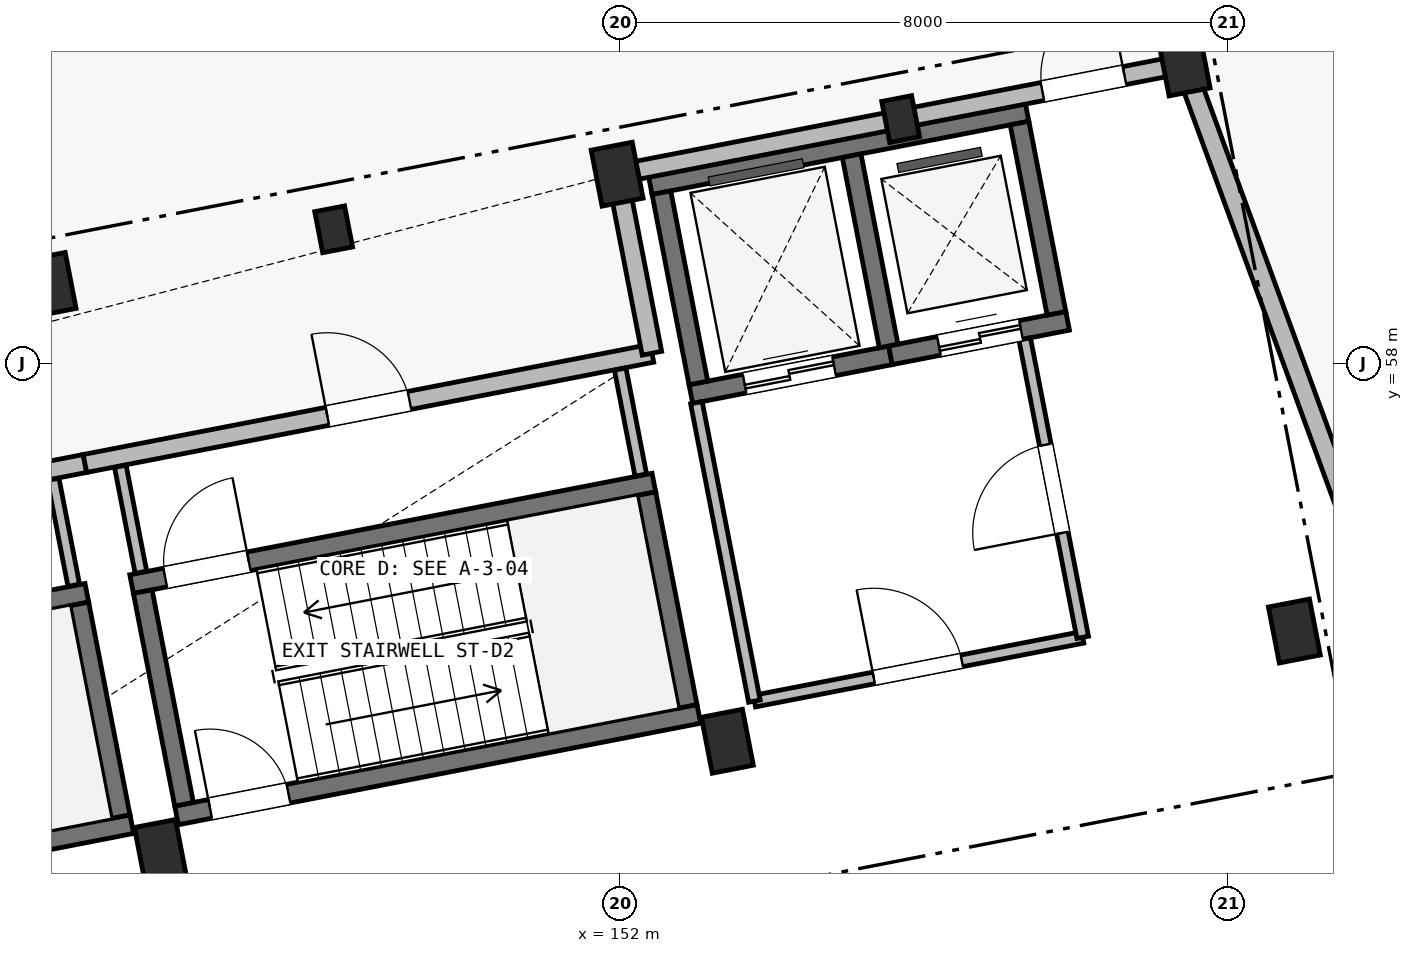
"""IFC4 building model, lengths in metres.
Left out: names, types, materials, properties, quantities, classifications, styles, units other than length and angle.
Written with IfcOpenShell. Run it as: python <this file> out.ifc"""

import sys

from ifc_helpers import new_model, si_unit, direction, frame, frame_2d, origin, origin_2d, place, context, subcontext, project, spatial, rectangle, extrude, element, fill, save


model = new_model("IFC4")
c1 = context("Model", 3, precision=1e-05, world=origin(), true_north=direction((0.0, 1.0)))
c2 = subcontext(c1, "Body", "Model", "MODEL_VIEW")
j1 = project(units=[si_unit("LENGTHUNIT", "METRE"), si_unit("PLANEANGLEUNIT", "RADIAN")], contexts=[c1])
p1 = place(None, origin())
s1 = spatial("IfcSite", under=j1, at=p1, CompositionType="ELEMENT")
p2 = place(p1, origin())
s2 = spatial("IfcBuilding", under=s1, at=p2, CompositionType="ELEMENT")
p3 = place(p2, origin())
s3 = spatial("IfcBuildingStorey", under=s2, at=p3, CompositionType="ELEMENT", Elevation=0.0)
for number, where, z_axis, x_axis in (
    (1, (145.952, 51.58, -0.35), (0.0, 0.0, 1.0), (0.982, 0.191, 0.0)),
    (2, (144.502, 59.041, -0.35), (0.0, 0.0, 1.0), (0.982, 0.191, 0.0)),
    (3, (153.412, 53.03, -0.35), (0.0, 0.0, 1.0), (0.982, 0.191, 0.0)),
    (4, (151.962, 60.491, -0.35), (0.0, 0.0, 1.0), (0.982, 0.191, 0.0)),
    (5, (160.873, 54.48, -0.35), (0.0, 0.0, 1.0), (0.982, 0.191, 0.0)),
    (6, (159.422, 61.941, -0.35), (0.0, 0.0, 1.0), (0.982, 0.191, 0.0)),
):
    element("IfcColumn", number, at=place(p3, frame(where, z_axis=z_axis, x_axis=x_axis)), inside=s3, PredefinedType="COLUMN", context=c2, shape_type="SweptSolid", body=[
        extrude(rectangle(XDim=0.55, YDim=0.75, at=origin_2d()), origin(), (0.0, 0.0, 1.0), 4.85),
    ])
for number, where, z_axis, x_axis in (
    (7, (148.232, 59.766, -0.35), (0.0, 0.0, 1.0), (0.982, 0.191, 0.0)),
    (8, (155.692, 61.216, -0.35), (0.0, 0.0, 1.0), (0.982, 0.191, 0.0)),
):
    element("IfcColumn", number, at=place(p3, frame(where, z_axis=z_axis, x_axis=x_axis)), inside=s3, PredefinedType="PILASTER", context=c2, shape_type="SweptSolid", body=[
        extrude(rectangle(XDim=0.4, YDim=0.55, at=origin_2d()), origin(), (0.0, 0.0, 1.0), 3.7),
    ])
p4 = place(p3, frame((152.397, 60.346, -0.35), z_axis=(0.0, 0.0, 1.0), x_axis=(0.981635261308, 0.190767433692, 0.0)))
e9 = element("IfcWall", 9, at=p4, inside=s3, PredefinedType="SHEAR", context=c2, shape_type="SweptSolid", body=[
    extrude(rectangle(XDim=5.05, YDim=0.25, at=frame_2d((2.525, 0.0))), origin(), (0.0, 0.0, 1.0), 4.85),
])
p5 = place(p3, frame((152.932, 57.598, -0.35), z_axis=(0.0, 0.0, 1.0), x_axis=(0.981636759622, 0.190759723627, 0.0)))
e10 = element("IfcWall", 10, at=p5, inside=s3, PredefinedType="SHEAR", context=c2, shape_type="SweptSolid", body=[
    extrude(rectangle(XDim=2.675, YDim=0.25, at=frame_2d((1.337, 0.0))), origin(), (0.0, 0.0, 1.0), 4.85),
])
p6 = place(p5, frame((0.72, 0.0, 0.35)))
e11 = element("IfcOpeningElement", 11, at=p6, cuts=e10, PredefinedType="OPENING", context=c2, shape_type="SweptSolid", body=[
    extrude(rectangle(XDim=1.2, YDim=2.2, at=frame_2d((0.6, 1.1))), frame((0.0, 0.14, 0.0), z_axis=(0.0, -1.0, 0.0), x_axis=(1.0, 0.0, 0.0)), (0.0, 0.0, 1.0), 0.28),
])
p7 = place(p3, frame((155.558, 58.108, -0.35), z_axis=(0.0, 0.0, 1.0), x_axis=(0.981633573872, 0.190776116556, 0.0)))
e12 = element("IfcWall", 12, at=p7, inside=s3, PredefinedType="SHEAR", context=c2, shape_type="SweptSolid", body=[
    extrude(rectangle(XDim=2.375, YDim=0.25, at=frame_2d((1.188, 0.0))), origin(), (0.0, 0.0, 1.0), 4.85),
])
p8 = place(p7, frame((0.65, 0.0, 0.35)))
e13 = element("IfcOpeningElement", 13, at=p8, cuts=e12, PredefinedType="OPENING", context=c2, shape_type="SweptSolid", body=[
    extrude(rectangle(XDim=1.1, YDim=2.15, at=frame_2d((0.55, 1.075))), frame((0.0, 0.14, 0.0), z_axis=(0.0, -1.0, 0.0), x_axis=(1.0, 0.0, 0.0)), (0.0, 0.0, 1.0), 0.28),
])
for number, where, z_axis, x_axis in (
    (14, (153.031, 57.744, -0.35), (0.0, 0.0, 1.0), (-0.191, 0.982, 0.0)),
    (15, (155.534, 58.231, -0.35), (0.0, 0.0, 1.0), (-0.191, 0.982, 0.0)),
    (16, (157.742, 58.66, -0.35), (0.0, 0.0, 1.0), (-0.191, 0.982, 0.0)),
):
    element("IfcWall", number, at=place(p3, frame(where, z_axis=z_axis, x_axis=x_axis)), inside=s3, PredefinedType="SHEAR", context=c2, shape_type="SweptSolid", body=[
        extrude(rectangle(XDim=2.55, YDim=0.25, at=frame_2d((1.275, 0.0))), origin(), (0.0, 0.0, 1.0), 4.85),
    ])
p9 = place(p3, frame((138.113, 53.647, -0.35), z_axis=(0.0, 0.0, 1.0), x_axis=(0.981626097708, 0.19081458094, 0.0)))
e17 = element("IfcWall", 17, at=p9, inside=s3, PredefinedType="SHEAR", context=c2, shape_type="SweptSolid", body=[
    extrude(rectangle(XDim=7.0, YDim=0.25, at=frame_2d((3.5, 0.0))), origin(), (0.0, 0.0, 1.0), 4.85),
])
p10 = place(p9, frame((0.45, 0.0, 0.35)))
e18 = element("IfcOpeningElement", 18, at=p10, cuts=e17, PredefinedType="OPENING", context=c2, shape_type="SweptSolid", body=[
    extrude(rectangle(XDim=1.12, YDim=2.15, at=frame_2d((0.56, 1.075))), frame((0.0, 0.14, 0.0), z_axis=(0.0, -1.0, 0.0), x_axis=(1.0, 0.0, 0.0)), (0.0, 0.0, 1.0), 0.28),
])
p11 = place(p3, frame((138.705, 50.604, -0.35), z_axis=(0.0, 0.0, 1.0), x_axis=(0.981626097708, 0.19081458094, 0.0)))
e19 = element("IfcWall", 19, at=p11, inside=s3, PredefinedType="SHEAR", context=c2, shape_type="SweptSolid", body=[
    extrude(rectangle(XDim=7.0, YDim=0.25, at=frame_2d((3.5, 0.0))), origin(), (0.0, 0.0, 1.0), 4.85),
])
p12 = place(p11, frame((0.45, 0.0, 0.35)))
e20 = element("IfcOpeningElement", 20, at=p12, cuts=e19, PredefinedType="OPENING", context=c2, shape_type="SweptSolid", body=[
    extrude(rectangle(XDim=1.05, YDim=2.15, at=frame_2d((0.525, 1.075))), frame((0.0, 0.14, 0.0), z_axis=(0.0, -1.0, 0.0), x_axis=(1.0, 0.0, 0.0)), (0.0, 0.0, 1.0), 0.28),
])
p13 = place(p3, frame((145.43, 52.039, -0.35), z_axis=(0.0, 0.0, 1.0), x_axis=(-0.190842147128, 0.981620738819, 0.0)))
e21 = element("IfcWall", 21, at=p13, inside=s3, PredefinedType="SHEAR", context=c2, shape_type="SweptSolid", body=[
    extrude(rectangle(XDim=2.85, YDim=0.25, at=frame_2d((1.425, 0.0))), origin(), (0.0, 0.0, 1.0), 4.85),
])
p14 = place(p3, frame((145.574, 55.098, -0.35), z_axis=(0.0, 0.0, 1.0), x_axis=(0.981626097708, 0.19081458094, 0.0)))
e22 = element("IfcWall", 22, at=p14, inside=s3, PredefinedType="SHEAR", context=c2, shape_type="SweptSolid", body=[
    extrude(rectangle(XDim=7.0, YDim=0.25, at=frame_2d((3.5, 0.0))), origin(), (0.0, 0.0, 1.0), 4.85),
])
p15 = place(p14, frame((0.45, 0.0, 0.35)))
e23 = element("IfcOpeningElement", 23, at=p15, cuts=e22, PredefinedType="OPENING", context=c2, shape_type="SweptSolid", body=[
    extrude(rectangle(XDim=1.12, YDim=2.15, at=frame_2d((0.56, 1.075))), frame((0.0, 0.14, 0.0), z_axis=(0.0, -1.0, 0.0), x_axis=(1.0, 0.0, 0.0)), (0.0, 0.0, 1.0), 0.28),
])
p16 = place(p3, frame((146.165, 52.054, -0.35), z_axis=(0.0, 0.0, 1.0), x_axis=(0.981627367538, 0.190808048312, 0.0)))
e24 = element("IfcWall", 24, at=p16, inside=s3, PredefinedType="SHEAR", context=c2, shape_type="SweptSolid", body=[
    extrude(rectangle(XDim=7.0, YDim=0.25, at=frame_2d((3.5, 0.0))), origin(), (0.0, 0.0, 1.0), 4.85),
])
p17 = place(p16, frame((0.45, 0.0, 0.35)))
e25 = element("IfcOpeningElement", 25, at=p17, cuts=e24, PredefinedType="OPENING", context=c2, shape_type="SweptSolid", body=[
    extrude(rectangle(XDim=1.05, YDim=2.15, at=frame_2d((0.525, 1.075))), frame((0.0, 0.14, 0.0), z_axis=(0.0, -1.0, 0.0), x_axis=(1.0, 0.0, 0.0)), (0.0, 0.0, 1.0), 0.28),
])
for number, where, z_axis, x_axis in (
    (26, (146.264, 52.201, -0.35), (0.0, 0.0, 1.0), (-0.191, 0.982, 0.0)),
    (27, (152.89, 53.489, -0.35), (0.0, 0.0, 1.0), (-0.191, 0.982, 0.0)),
):
    element("IfcWall", number, at=place(p3, frame(where, z_axis=z_axis, x_axis=x_axis)), inside=s3, PredefinedType="SHEAR", context=c2, shape_type="SweptSolid", body=[
        extrude(rectangle(XDim=2.85, YDim=0.25, at=frame_2d((1.425, 0.0))), origin(), (0.0, 0.0, 1.0), 4.85),
    ])
p18 = place(p3, frame((137.499, 55.234, 0.0), z_axis=(0.0, 0.0, 1.0), x_axis=(0.981625252578, 0.19081892857, 0.0)))
e28 = element("IfcWall", 28, at=p18, inside=s3, PredefinedType="SOLIDWALL", context=c2, shape_type="SweptSolid", body=[
    extrude(rectangle(XDim=7.6, YDim=0.24, at=frame_2d((3.8, 0.0))), origin(), (0.0, 0.0, 1.0), 3.35),
])
p19 = place(p18, frame((3.25, 0.0, 0.0)))
e29 = element("IfcOpeningElement", 29, at=p19, cuts=e28, PredefinedType="OPENING", context=c2, shape_type="SweptSolid", body=[
    extrude(rectangle(XDim=1.1, YDim=2.15, at=frame_2d((0.55, 1.075))), frame((0.0, 0.135, 0.0), z_axis=(0.0, -1.0, 0.0), x_axis=(1.0, 0.0, 0.0)), (0.0, 0.0, 1.0), 0.27),
])
p20 = place(p3, frame((144.959, 56.685, 0.0), z_axis=(0.0, 0.0, 1.0), x_axis=(0.981626422232, 0.190812911449, 0.0)))
e30 = element("IfcWall", 30, at=p20, inside=s3, PredefinedType="SOLIDWALL", context=c2, shape_type="SweptSolid", body=[
    extrude(rectangle(XDim=7.6, YDim=0.24, at=frame_2d((3.8, 0.0))), origin(), (0.0, 0.0, 1.0), 3.35),
])
p21 = place(p20, frame((3.25, 0.0, 0.0)))
e31 = element("IfcOpeningElement", 31, at=p21, cuts=e30, PredefinedType="OPENING", context=c2, shape_type="SweptSolid", body=[
    extrude(rectangle(XDim=1.1, YDim=2.15, at=frame_2d((0.55, 1.075))), frame((0.0, 0.135, 0.0), z_axis=(0.0, -1.0, 0.0), x_axis=(1.0, 0.0, 0.0)), (0.0, 0.0, 1.0), 0.27),
])
p22 = place(p3, frame((152.207, 60.538, 0.0), z_axis=(0.0, 0.0, 1.0), x_axis=(0.98162827229, 0.190803393686, 0.0)))
e32 = element("IfcWall", 32, at=p22, inside=s3, PredefinedType="SOLIDWALL", context=c2, shape_type="SweptSolid", body=[
    extrude(rectangle(XDim=7.1, YDim=0.24, at=frame_2d((3.55, 0.0))), origin(), (0.0, 0.0, 1.0), 3.35),
])
p23 = place(p22, frame((5.45, 0.0, 0.0)))
e33 = element("IfcOpeningElement", 33, at=p23, cuts=e32, PredefinedType="OPENING", context=c2, shape_type="SweptSolid", body=[
    extrude(rectangle(XDim=1.1, YDim=2.15, at=frame_2d((0.55, 1.075))), frame((0.0, 0.135, 0.0), z_axis=(0.0, -1.0, 0.0), x_axis=(1.0, 0.0, 0.0)), (0.0, 0.0, 1.0), 0.27),
])
p24 = place(p3, frame((159.422, 61.941, 0.0), z_axis=(0.0, 0.0, 1.0), x_axis=(0.3439512016, -0.938987524368, 0.0)))
e34 = element("IfcWall", 34, at=p24, inside=s3, PredefinedType="SOLIDWALL", context=c2, shape_type="SweptSolid", body=[
    extrude(rectangle(XDim=16.407, YDim=0.26, at=frame_2d((8.204, 0.0))), origin(), (0.0, 0.0, 1.0), 3.35),
])
p25 = place(p3, frame((152.42, 58.135, 0.0), z_axis=(0.0, 0.0, 1.0), x_axis=(-0.190831541356, 0.981622800685, 0.0)))
e35 = element("IfcWall", 35, at=p25, inside=s3, PredefinedType="SOLIDWALL", context=c2, shape_type="SweptSolid", body=[
    extrude(rectangle(XDim=2.4, YDim=0.26, at=frame_2d((1.2, 0.0))), origin(), (0.0, 0.0, 1.0), 3.35),
])
p26 = place(p3, frame((153.768, 53.558, 0.0), z_axis=(0.0, 0.0, 1.0), x_axis=(0.981624918225, 0.190820648566, 0.0)))
e36 = element("IfcWall", 36, at=p26, inside=s3, PredefinedType="PARTITIONING", context=c2, shape_type="SweptSolid", body=[
    extrude(rectangle(XDim=4.4, YDim=0.155, at=frame_2d((2.2, 0.0))), origin(), (0.0, 0.0, 1.0), 4.22),
])
p27 = place(p26, frame((1.6, 0.0, 0.0)))
e37 = element("IfcOpeningElement", 37, at=p27, cuts=e36, PredefinedType="OPENING", context=c2, shape_type="SweptSolid", body=[
    extrude(rectangle(XDim=1.18, YDim=2.15, at=frame_2d((0.59, 1.075))), frame((0.0, 0.093, 0.0), z_axis=(0.0, -1.0, 0.0), x_axis=(1.0, 0.0, 0.0)), (0.0, 0.0, 1.0), 0.185),
])
p28 = place(p3, frame((153.768, 53.558, 0.0), z_axis=(0.0, 0.0, 1.0), x_axis=(-0.19085495634, 0.981618248425, 0.0)))
e38 = element("IfcWall", 38, at=p28, inside=s3, PredefinedType="PARTITIONING", context=c2, shape_type="SweptSolid", body=[
    extrude(rectangle(XDim=4.0, YDim=0.155, at=frame_2d((2.0, 0.0))), origin(), (0.0, 0.0, 1.0), 3.35),
])
p29 = place(p3, frame((158.087, 54.397, 0.0), z_axis=(0.0, 0.0, 1.0), x_axis=(-0.190796144009, 0.981629681413, 0.0)))
e39 = element("IfcWall", 39, at=p29, inside=s3, PredefinedType="PARTITIONING", context=c2, shape_type="SweptSolid", body=[
    extrude(rectangle(XDim=4.0, YDim=0.155, at=frame_2d((2.0, 0.0))), origin(), (0.0, 0.0, 1.0), 4.22),
])
p30 = place(p29, frame((1.4, 0.0, 0.0)))
e40 = element("IfcOpeningElement", 40, at=p30, cuts=e39, PredefinedType="OPENING", context=c2, shape_type="SweptSolid", body=[
    extrude(rectangle(XDim=1.18, YDim=2.15, at=frame_2d((0.59, 1.075))), frame((0.0, 0.093, 0.0), z_axis=(0.0, -1.0, 0.0), x_axis=(1.0, 0.0, 0.0)), (0.0, 0.0, 1.0), 0.185),
])
p31 = place(p3, frame((144.812, 55.082, 0.0), z_axis=(0.0, 0.0, 1.0), x_axis=(-0.190657983598, 0.98165652511, 0.0)))
e41 = element("IfcWall", 41, at=p31, inside=s3, PredefinedType="PARTITIONING", context=c2, shape_type="SweptSolid", body=[
    extrude(rectangle(XDim=1.42, YDim=0.155, at=frame_2d((0.71, 0.0))), origin(), (0.0, 0.0, 1.0), 3.35),
])
p32 = place(p3, frame((145.696, 55.254, 0.0), z_axis=(0.0, 0.0, 1.0), x_axis=(-0.190855852571, 0.981618074171, 0.0)))
e42 = element("IfcWall", 42, at=p32, inside=s3, PredefinedType="PARTITIONING", context=c2, shape_type="SweptSolid", body=[
    extrude(rectangle(XDim=1.42, YDim=0.155, at=frame_2d((0.71, 0.0))), origin(), (0.0, 0.0, 1.0), 3.35),
])
p33 = place(p3, frame((152.273, 56.532, 0.0), z_axis=(0.0, 0.0, 1.0), x_axis=(-0.190823644952, 0.981624335745, 0.0)))
e43 = element("IfcWall", 43, at=p33, inside=s3, PredefinedType="PARTITIONING", context=c2, shape_type="SweptSolid", body=[
    extrude(rectangle(XDim=1.42, YDim=0.155, at=frame_2d((0.71, 0.0))), origin(), (0.0, 0.0, 1.0), 3.35),
])
p34 = place(p21, origin())
e44 = element("IfcDoor", 44, at=p34, inside=s3, OperationType="SINGLE_SWING_LEFT", PredefinedType="DOOR", context=c2, shape_type="SweptSolid", body=[
    extrude(rectangle(XDim=1.1, YDim=2.15, at=frame_2d((0.55, 1.075))), frame((0.0, 0.025, 0.0), z_axis=(0.0, -1.0, 0.0), x_axis=(1.0, 0.0, 0.0)), (0.0, 0.0, 1.0), 0.05),
])
fill(e31, e44)
p35 = place(p23, origin())
e45 = element("IfcDoor", 45, at=p35, inside=s3, OperationType="SINGLE_SWING_RIGHT", PredefinedType="DOOR", context=c2, shape_type="SweptSolid", body=[
    extrude(rectangle(XDim=1.1, YDim=2.15, at=frame_2d((0.55, 1.075))), frame((0.0, 0.025, 0.0), z_axis=(0.0, -1.0, 0.0), x_axis=(1.0, 0.0, 0.0)), (0.0, 0.0, 1.0), 0.05),
])
fill(e33, e45)
p36 = place(p27, origin())
e46 = element("IfcDoor", 46, at=p36, inside=s3, OperationType="SINGLE_SWING_LEFT", PredefinedType="DOOR", context=c2, shape_type="SweptSolid", body=[
    extrude(rectangle(XDim=1.18, YDim=2.15, at=frame_2d((0.59, 1.075))), frame((0.0, 0.025, 0.0), z_axis=(0.0, -1.0, 0.0), x_axis=(1.0, 0.0, 0.0)), (0.0, 0.0, 1.0), 0.05),
])
fill(e37, e46)
p37 = place(p30, origin())
e47 = element("IfcDoor", 47, at=p37, inside=s3, OperationType="SINGLE_SWING_LEFT", PredefinedType="DOOR", context=c2, shape_type="SweptSolid", body=[
    extrude(rectangle(XDim=1.18, YDim=2.15, at=frame_2d((0.59, 1.075))), frame((0.0, 0.025, 0.0), z_axis=(0.0, -1.0, 0.0), x_axis=(1.0, 0.0, 0.0)), (0.0, 0.0, 1.0), 0.05),
])
fill(e40, e47)
p38 = place(p17, origin())
e48 = element("IfcDoor", 48, at=p38, inside=s3, OperationType="SINGLE_SWING_LEFT", PredefinedType="DOOR", context=c2, shape_type="SweptSolid", body=[
    extrude(rectangle(XDim=1.05, YDim=2.15, at=frame_2d((0.525, 1.075))), frame((0.0, 0.025, 0.0), z_axis=(0.0, -1.0, 0.0), x_axis=(1.0, 0.0, 0.0)), (0.0, 0.0, 1.0), 0.05),
])
fill(e25, e48)
p39 = place(p15, origin())
e49 = element("IfcDoor", 49, at=p39, inside=s3, OperationType="SINGLE_SWING_RIGHT", PredefinedType="DOOR", context=c2, shape_type="SweptSolid", body=[
    extrude(rectangle(XDim=1.12, YDim=2.15, at=frame_2d((0.56, 1.075))), frame((0.0, 0.025, 0.0), z_axis=(0.0, -1.0, 0.0), x_axis=(1.0, 0.0, 0.0)), (0.0, 0.0, 1.0), 0.05),
])
fill(e23, e49)
p40 = place(p6, origin())
e50 = element("IfcDoor", 50, at=p40, inside=s3, OperationType="DOUBLE_DOOR_SLIDING", PredefinedType="DOOR", context=c2, shape_type="SweptSolid", body=[
    extrude(rectangle(XDim=1.2, YDim=2.2, at=frame_2d((0.6, 1.1))), frame((0.0, 0.025, 0.0), z_axis=(0.0, -1.0, 0.0), x_axis=(1.0, 0.0, 0.0)), (0.0, 0.0, 1.0), 0.05),
])
fill(e11, e50)
p41 = place(p8, origin())
e51 = element("IfcDoor", 51, at=p41, inside=s3, OperationType="DOUBLE_DOOR_SLIDING", PredefinedType="DOOR", context=c2, shape_type="SweptSolid", body=[
    extrude(rectangle(XDim=1.1, YDim=2.15, at=frame_2d((0.55, 1.075))), frame((0.0, 0.025, 0.0), z_axis=(0.0, -1.0, 0.0), x_axis=(1.0, 0.0, 0.0)), (0.0, 0.0, 1.0), 0.05),
])
fill(e13, e51)
save(model, sys.argv[1])
